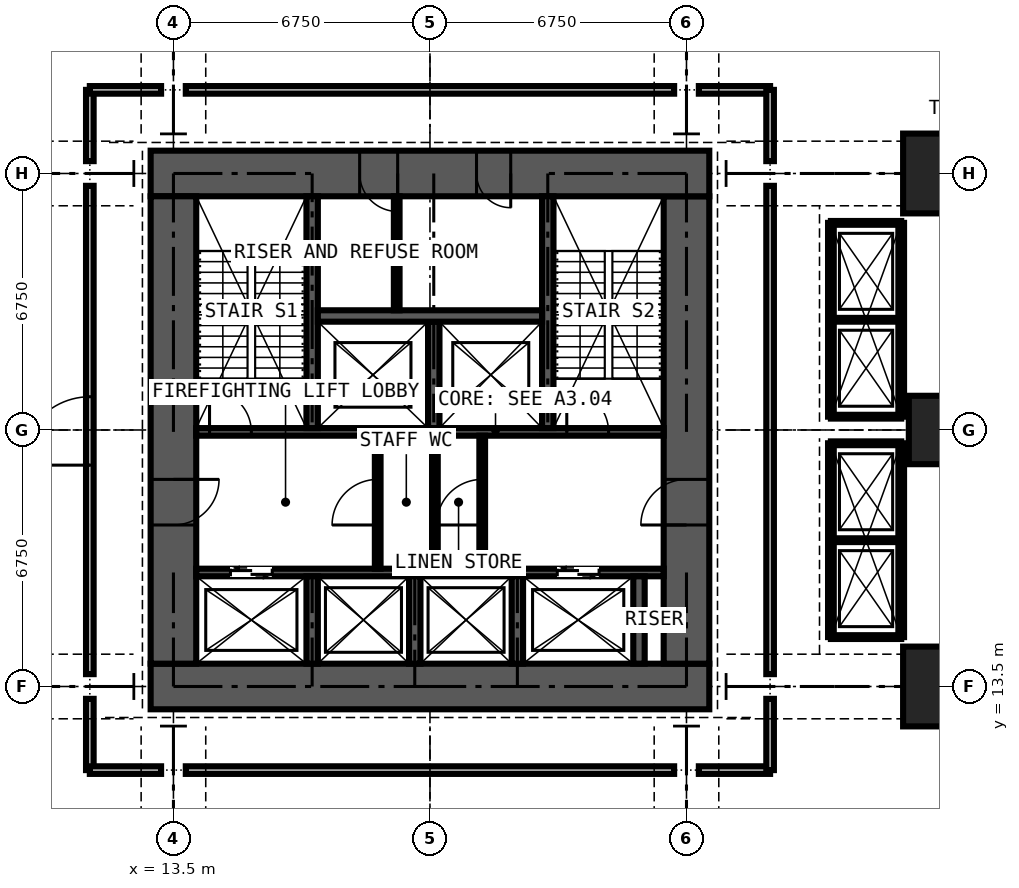
"""IFC4 building model, lengths in metres.
Left out: names, types, materials, properties, quantities, classifications, styles, units other than length and angle.
Written with IfcOpenShell. Run it as: python <this file> out.ifc"""

import sys

from ifc_helpers import new_model, si_unit, direction, frame, frame_2d, origin, origin_2d, place, context, subcontext, project, spatial, rectangle, extrude, element, fill, save


model = new_model("IFC4")
c1 = context("Model", 3, precision=1e-05, world=origin(), true_north=direction((0.0, 1.0)))
c2 = subcontext(c1, "Body", "Model", "MODEL_VIEW")
j1 = project(units=[si_unit("LENGTHUNIT", "METRE"), si_unit("PLANEANGLEUNIT", "RADIAN")], contexts=[c1])
p1 = place(None, origin())
s1 = spatial("IfcSite", under=j1, at=p1, CompositionType="ELEMENT")
p2 = place(p1, origin())
s2 = spatial("IfcBuilding", under=s1, at=p2, CompositionType="ELEMENT")
p3 = place(p2, frame((0.0, 0.0, 75.6)))
s3 = spatial("IfcBuildingStorey", under=s2, at=p3, CompositionType="ELEMENT", Elevation=75.6)
p4 = place(p3, frame((33.75, 13.5, 0.0), z_axis=(0.0, 0.0, 1.0), x_axis=(1.0, 0.0, 0.0)))
e1 = element("IfcColumn", 1, at=p4, inside=s3, PredefinedType="COLUMN", context=c2, shape_type="SweptSolid", body=[
    extrude(rectangle(XDim=2.1, YDim=2.1, at=origin_2d()), origin(), (0.0, 0.0, 1.0), 4.5),
])
p5 = place(p3, frame((33.75, 20.25, 0.0), z_axis=(0.0, 0.0, 1.0), x_axis=(1.0, 0.0, 0.0)))
e2 = element("IfcColumn", 2, at=p5, inside=s3, PredefinedType="COLUMN", context=c2, shape_type="SweptSolid", body=[
    extrude(rectangle(XDim=1.8, YDim=1.8, at=origin_2d()), origin(), (0.0, 0.0, 1.0), 4.5),
])
p6 = place(p3, frame((33.75, 27.0, 0.0), z_axis=(0.0, 0.0, 1.0), x_axis=(1.0, 0.0, 0.0)))
e3 = element("IfcColumn", 3, at=p6, inside=s3, PredefinedType="COLUMN", context=c2, shape_type="SweptSolid", body=[
    extrude(rectangle(XDim=2.1, YDim=2.1, at=origin_2d()), origin(), (0.0, 0.0, 1.0), 4.5),
])
p7 = place(p3, frame((12.9, 13.5, 0.0), z_axis=(0.0, 0.0, 1.0), x_axis=(1.0, 0.0, 0.0)))
e4 = element("IfcWall", 4, at=p7, inside=s3, PredefinedType="SHEAR", context=c2, shape_type="SweptSolid", body=[
    extrude(rectangle(XDim=14.7, YDim=1.2, at=frame_2d((7.35, 0.0))), origin(), (0.0, 0.0, 1.0), 4.5),
])
p8 = place(p3, frame((27.0, 14.1, 0.0), z_axis=(0.0, 0.0, 1.0), x_axis=(0.0, 1.0, 0.0)))
e5 = element("IfcWall", 5, at=p8, inside=s3, PredefinedType="SHEAR", context=c2, shape_type="SweptSolid", body=[
    extrude(rectangle(XDim=12.3, YDim=1.2, at=frame_2d((6.15, 0.0))), origin(), (0.0, 0.0, 1.0), 4.5),
])
p9 = place(p8, frame((3.65, 0.0, 0.0)))
e6 = element("IfcOpeningElement", 6, at=p9, cuts=e5, PredefinedType="OPENING", context=c2, shape_type="SweptSolid", body=[
    extrude(rectangle(XDim=1.2, YDim=2.2, at=frame_2d((0.6, 1.1))), frame((0.0, 0.61, 0.0), z_axis=(0.0, -1.0, 0.0), x_axis=(1.0, 0.0, 0.0)), (0.0, 0.0, 1.0), 1.22),
])
p10 = place(p3, frame((27.6, 27.0, 0.0), z_axis=(0.0, 0.0, 1.0), x_axis=(-1.0, 0.0, 0.0)))
e7 = element("IfcWall", 7, at=p10, inside=s3, PredefinedType="SHEAR", context=c2, shape_type="SweptSolid", body=[
    extrude(rectangle(XDim=14.7, YDim=1.2, at=frame_2d((7.35, 0.0))), origin(), (0.0, 0.0, 1.0), 4.5),
])
p11 = place(p10, frame((5.225, 0.0, 0.0)))
e8 = element("IfcOpeningElement", 8, at=p11, cuts=e7, PredefinedType="OPENING", context=c2, shape_type="SweptSolid", body=[
    extrude(rectangle(XDim=0.9, YDim=2.2, at=frame_2d((0.45, 1.1))), frame((0.0, 0.61, 0.0), z_axis=(0.0, -1.0, 0.0), x_axis=(1.0, 0.0, 0.0)), (0.0, 0.0, 1.0), 1.22),
])
p12 = place(p10, frame((8.2, 0.0, 0.0)))
e9 = element("IfcOpeningElement", 9, at=p12, cuts=e7, PredefinedType="OPENING", context=c2, shape_type="SweptSolid", body=[
    extrude(rectangle(XDim=1.0, YDim=2.2, at=frame_2d((0.5, 1.1))), frame((0.0, 0.61, 0.0), z_axis=(0.0, -1.0, 0.0), x_axis=(1.0, 0.0, 0.0)), (0.0, 0.0, 1.0), 1.22),
])
p13 = place(p3, frame((13.5, 26.4, 0.0), z_axis=(0.0, 0.0, 1.0), x_axis=(0.0, -1.0, 0.0)))
e10 = element("IfcWall", 10, at=p13, inside=s3, PredefinedType="SHEAR", context=c2, shape_type="SweptSolid", body=[
    extrude(rectangle(XDim=12.3, YDim=1.2, at=frame_2d((6.15, 0.0))), origin(), (0.0, 0.0, 1.0), 4.5),
])
p14 = place(p13, frame((7.45, 0.0, 0.0)))
e11 = element("IfcOpeningElement", 11, at=p14, cuts=e10, PredefinedType="OPENING", context=c2, shape_type="SweptSolid", body=[
    extrude(rectangle(XDim=1.2, YDim=2.2, at=frame_2d((0.6, 1.1))), frame((0.0, 0.61, 0.0), z_axis=(0.0, -1.0, 0.0), x_axis=(1.0, 0.0, 0.0)), (0.0, 0.0, 1.0), 1.22),
])
p15 = place(p3, frame((14.1, 16.5, 0.0), z_axis=(0.0, 0.0, 1.0), x_axis=(1.0, 0.0, 0.0)))
e12 = element("IfcWall", 12, at=p15, inside=s3, PredefinedType="SHEAR", context=c2, shape_type="SweptSolid", body=[
    extrude(rectangle(XDim=12.3, YDim=0.2, at=frame_2d((6.15, 0.0))), origin(), (0.0, 0.0, 1.0), 4.5),
])
p16 = place(p15, frame((0.9, 0.0, 0.0)))
e13 = element("IfcOpeningElement", 13, at=p16, cuts=e12, PredefinedType="OPENING", context=c2, shape_type="SweptSolid", body=[
    extrude(rectangle(XDim=1.1, YDim=2.2, at=frame_2d((0.55, 1.1))), frame((0.0, 0.11, 0.0), z_axis=(0.0, -1.0, 0.0), x_axis=(1.0, 0.0, 0.0)), (0.0, 0.0, 1.0), 0.22),
])
p17 = place(p15, frame((9.5, 0.0, 0.0)))
e14 = element("IfcOpeningElement", 14, at=p17, cuts=e12, PredefinedType="OPENING", context=c2, shape_type="SweptSolid", body=[
    extrude(rectangle(XDim=1.1, YDim=2.2, at=frame_2d((0.55, 1.1))), frame((0.0, 0.11, 0.0), z_axis=(0.0, -1.0, 0.0), x_axis=(1.0, 0.0, 0.0)), (0.0, 0.0, 1.0), 0.22),
])
p18 = place(p3, frame((14.1, 20.2, 0.0), z_axis=(0.0, 0.0, 1.0), x_axis=(1.0, 0.0, 0.0)))
e15 = element("IfcWall", 15, at=p18, inside=s3, PredefinedType="SHEAR", context=c2, shape_type="SweptSolid", body=[
    extrude(rectangle(XDim=12.3, YDim=0.2, at=frame_2d((6.15, 0.0))), origin(), (0.0, 0.0, 1.0), 4.5),
])
p19 = place(p18, frame((0.35, 0.0, 0.0)))
e16 = element("IfcOpeningElement", 16, at=p19, cuts=e15, PredefinedType="OPENING", context=c2, shape_type="SweptSolid", body=[
    extrude(rectangle(XDim=1.1, YDim=2.2, at=frame_2d((0.55, 1.1))), frame((0.0, 0.11, 0.0), z_axis=(0.0, -1.0, 0.0), x_axis=(1.0, 0.0, 0.0)), (0.0, 0.0, 1.0), 0.22),
])
p20 = place(p18, frame((9.75, 0.0, 0.0)))
e17 = element("IfcOpeningElement", 17, at=p20, cuts=e15, PredefinedType="OPENING", context=c2, shape_type="SweptSolid", body=[
    extrude(rectangle(XDim=1.1, YDim=2.2, at=frame_2d((0.55, 1.1))), frame((0.0, 0.11, 0.0), z_axis=(0.0, -1.0, 0.0), x_axis=(1.0, 0.0, 0.0)), (0.0, 0.0, 1.0), 0.22),
])
for number, where, z_axis, x_axis in (
    (18, (17.15, 20.3, 0.0), (0.0, 0.0, 1.0), (0.0, 1.0, 0.0)),
    (19, (23.35, 20.3, 0.0), (0.0, 0.0, 1.0), (0.0, 1.0, 0.0)),
):
    element("IfcWall", number, at=place(p3, frame(where, z_axis=z_axis, x_axis=x_axis)), inside=s3, PredefinedType="SHEAR", context=c2, shape_type="SweptSolid", body=[
        extrude(rectangle(XDim=6.1, YDim=0.3, at=frame_2d((3.05, 0.0))), origin(), (0.0, 0.0, 1.0), 4.5),
    ])
p21 = place(p3, frame((20.35, 20.3, 0.0), z_axis=(0.0, 0.0, 1.0), x_axis=(0.0, 1.0, 0.0)))
e20 = element("IfcWall", 20, at=p21, inside=s3, PredefinedType="SHEAR", context=c2, shape_type="SweptSolid", body=[
    extrude(rectangle(XDim=2.8, YDim=0.3, at=frame_2d((1.4, 0.0))), origin(), (0.0, 0.0, 1.0), 4.5),
])
p22 = place(p3, frame((17.3, 23.25, 0.0), z_axis=(0.0, 0.0, 1.0), x_axis=(1.0, 0.0, 0.0)))
e21 = element("IfcWall", 21, at=p22, inside=s3, PredefinedType="SHEAR", context=c2, shape_type="SweptSolid", body=[
    extrude(rectangle(XDim=5.9, YDim=0.3, at=frame_2d((2.95, 0.0))), origin(), (0.0, 0.0, 1.0), 4.5),
])
for number, where, z_axis, x_axis in (
    (22, (17.15, 14.1, 0.0), (0.0, 0.0, 1.0), (0.0, 1.0, 0.0)),
    (23, (19.85, 14.1, 0.0), (0.0, 0.0, 1.0), (0.0, 1.0, 0.0)),
    (24, (22.55, 14.1, 0.0), (0.0, 0.0, 1.0), (0.0, 1.0, 0.0)),
    (25, (25.75, 14.1, 0.0), (0.0, 0.0, 1.0), (0.0, 1.0, 0.0)),
):
    element("IfcWall", number, at=place(p3, frame(where, z_axis=z_axis, x_axis=x_axis)), inside=s3, PredefinedType="SHEAR", context=c2, shape_type="SweptSolid", body=[
        extrude(rectangle(XDim=2.3, YDim=0.3, at=frame_2d((1.15, 0.0))), origin(), (0.0, 0.0, 1.0), 4.5),
    ])
p23 = place(p3, frame((18.875, 16.6, 0.0), z_axis=(0.0, 0.0, 1.0), x_axis=(0.0, 1.0, 0.0)))
e26 = element("IfcWall", 26, at=p23, inside=s3, PredefinedType="PARTITIONING", context=c2, shape_type="SweptSolid", body=[
    extrude(rectangle(XDim=3.5, YDim=0.15, at=frame_2d((1.75, 0.0))), origin(), (0.0, 0.0, 1.0), 4.15),
])
p24 = place(p23, frame((1.15, 0.0, 0.0)))
e27 = element("IfcOpeningElement", 27, at=p24, cuts=e26, PredefinedType="OPENING", context=c2, shape_type="SweptSolid", body=[
    extrude(rectangle(XDim=1.2, YDim=2.2, at=frame_2d((0.6, 1.1))), frame((0.0, 0.085, 0.0), z_axis=(0.0, -1.0, 0.0), x_axis=(1.0, 0.0, 0.0)), (0.0, 0.0, 1.0), 0.17),
])
p25 = place(p3, frame((21.625, 16.6, 0.0), z_axis=(0.0, 0.0, 1.0), x_axis=(0.0, 1.0, 0.0)))
e28 = element("IfcWall", 28, at=p25, inside=s3, PredefinedType="PARTITIONING", context=c2, shape_type="SweptSolid", body=[
    extrude(rectangle(XDim=3.5, YDim=0.15, at=frame_2d((1.75, 0.0))), origin(), (0.0, 0.0, 1.0), 4.15),
])
p26 = place(p25, frame((1.15, 0.0, 0.0)))
e29 = element("IfcOpeningElement", 29, at=p26, cuts=e28, PredefinedType="OPENING", context=c2, shape_type="SweptSolid", body=[
    extrude(rectangle(XDim=1.2, YDim=2.2, at=frame_2d((0.6, 1.1))), frame((0.0, 0.085, 0.0), z_axis=(0.0, -1.0, 0.0), x_axis=(1.0, 0.0, 0.0)), (0.0, 0.0, 1.0), 0.17),
])
p27 = place(p3, frame((20.38, 16.6, 0.0), z_axis=(0.0, 0.0, 1.0), x_axis=(0.0, 1.0, 0.0)))
e30 = element("IfcWall", 30, at=p27, inside=s3, PredefinedType="PARTITIONING", context=c2, shape_type="SweptSolid", body=[
    extrude(rectangle(XDim=3.5, YDim=0.15, at=frame_2d((1.75, 0.0))), origin(), (0.0, 0.0, 1.0), 4.15),
])
p28 = place(p3, frame((19.375, 23.4, 0.0), z_axis=(0.0, 0.0, 1.0), x_axis=(0.0, 1.0, 0.0)))
e31 = element("IfcWall", 31, at=p28, inside=s3, PredefinedType="PARTITIONING", context=c2, shape_type="SweptSolid", body=[
    extrude(rectangle(XDim=3.0, YDim=0.15, at=frame_2d((1.5, 0.0))), origin(), (0.0, 0.0, 1.0), 4.15),
])
for number, where, z_axis, x_axis in (
    (32, (11.3, 11.3, 0.0), (0.0, 0.0, 1.0), (0.0, 1.0, 0.0)),
    (33, (11.3, 11.3, 0.0), (0.0, 0.0, 1.0), (1.0, 0.0, 0.0)),
):
    element("IfcWall", number, at=place(p3, frame(where, z_axis=z_axis, x_axis=x_axis)), inside=s3, PredefinedType="PARTITIONING", context=c2, shape_type="SweptSolid", body=[
        extrude(rectangle(XDim=1.875, YDim=0.2, at=frame_2d((0.938, 0.0))), origin(), (0.0, 0.0, 1.0), 4.15),
    ])
p29 = place(p3, frame((11.3, 13.825, 0.0), z_axis=(0.0, 0.0, 1.0), x_axis=(0.0, 1.0, 0.0)))
e34 = element("IfcWall", 34, at=p29, inside=s3, PredefinedType="PARTITIONING", context=c2, shape_type="SweptSolid", body=[
    extrude(rectangle(XDim=12.85, YDim=0.2, at=frame_2d((6.425, 0.0))), origin(), (0.0, 0.0, 1.0), 4.15),
])
p30 = place(p29, frame((5.5, 0.0, 0.0)))
e35 = element("IfcOpeningElement", 35, at=p30, cuts=e34, PredefinedType="OPENING", context=c2, shape_type="SweptSolid", body=[
    extrude(rectangle(XDim=1.8, YDim=2.4, at=frame_2d((0.9, 1.2))), frame((0.0, 0.11, 0.0), z_axis=(0.0, -1.0, 0.0), x_axis=(1.0, 0.0, 0.0)), (0.0, 0.0, 1.0), 0.22),
])
for number, where, z_axis, x_axis in (
    (36, (11.3, 27.325, 0.0), (0.0, 0.0, 1.0), (0.0, 1.0, 0.0)),
    (37, (11.3, 29.2, 0.0), (0.0, 0.0, 1.0), (1.0, 0.0, 0.0)),
):
    element("IfcWall", number, at=place(p3, frame(where, z_axis=z_axis, x_axis=x_axis)), inside=s3, PredefinedType="PARTITIONING", context=c2, shape_type="SweptSolid", body=[
        extrude(rectangle(XDim=1.875, YDim=0.2, at=frame_2d((0.938, 0.0))), origin(), (0.0, 0.0, 1.0), 4.15),
    ])
for number, where, z_axis, x_axis in (
    (38, (13.825, 11.3, 0.0), (0.0, 0.0, 1.0), (1.0, 0.0, 0.0)),
    (39, (13.825, 29.2, 0.0), (0.0, 0.0, 1.0), (1.0, 0.0, 0.0)),
):
    element("IfcWall", number, at=place(p3, frame(where, z_axis=z_axis, x_axis=x_axis)), inside=s3, PredefinedType="PARTITIONING", context=c2, shape_type="SweptSolid", body=[
        extrude(rectangle(XDim=12.85, YDim=0.2, at=frame_2d((6.425, 0.0))), origin(), (0.0, 0.0, 1.0), 4.15),
    ])
for number, where, z_axis, x_axis in (
    (40, (27.325, 11.3, 0.0), (0.0, 0.0, 1.0), (1.0, 0.0, 0.0)),
    (41, (27.325, 29.2, 0.0), (0.0, 0.0, 1.0), (1.0, 0.0, 0.0)),
    (42, (29.2, 11.3, 0.0), (0.0, 0.0, 1.0), (0.0, 1.0, 0.0)),
):
    element("IfcWall", number, at=place(p3, frame(where, z_axis=z_axis, x_axis=x_axis)), inside=s3, PredefinedType="PARTITIONING", context=c2, shape_type="SweptSolid", body=[
        extrude(rectangle(XDim=1.875, YDim=0.2, at=frame_2d((0.938, 0.0))), origin(), (0.0, 0.0, 1.0), 4.15),
    ])
p31 = place(p3, frame((29.2, 13.825, 0.0), z_axis=(0.0, 0.0, 1.0), x_axis=(0.0, 1.0, 0.0)))
e43 = element("IfcWall", 43, at=p31, inside=s3, PredefinedType="PARTITIONING", context=c2, shape_type="SweptSolid", body=[
    extrude(rectangle(XDim=12.85, YDim=0.2, at=frame_2d((6.425, 0.0))), origin(), (0.0, 0.0, 1.0), 4.15),
])
p32 = place(p3, frame((29.2, 27.325, 0.0), z_axis=(0.0, 0.0, 1.0), x_axis=(0.0, 1.0, 0.0)))
e44 = element("IfcWall", 44, at=p32, inside=s3, PredefinedType="PARTITIONING", context=c2, shape_type="SweptSolid", body=[
    extrude(rectangle(XDim=1.875, YDim=0.2, at=frame_2d((0.938, 0.0))), origin(), (0.0, 0.0, 1.0), 4.15),
])
p33 = place(p3, frame((30.8, 14.8, 0.0), z_axis=(0.0, 0.0, 1.0), x_axis=(0.0, 1.0, 0.0)))
e45 = element("IfcWall", 45, at=p33, inside=s3, PredefinedType="PARTITIONING", context=c2, shape_type="SweptSolid", body=[
    extrude(rectangle(XDim=5.1, YDim=0.15, at=frame_2d((2.55, 0.0))), origin(), (0.0, 0.0, 1.0), 4.15),
])
for number, where, z_axis, x_axis in (
    (46, (30.8, 14.8, 0.0), (0.0, 0.0, 1.0), (1.0, 0.0, 0.0)),
    (47, (30.8, 17.35, 0.0), (0.0, 0.0, 1.0), (1.0, 0.0, 0.0)),
    (48, (30.8, 19.9, 0.0), (0.0, 0.0, 1.0), (1.0, 0.0, 0.0)),
):
    element("IfcWall", number, at=place(p3, frame(where, z_axis=z_axis, x_axis=x_axis)), inside=s3, PredefinedType="SHEAR", context=c2, shape_type="SweptSolid", body=[
        extrude(rectangle(XDim=1.85, YDim=0.1, at=frame_2d((0.925, 0.0))), origin(), (0.0, 0.0, 1.0), 4.15),
    ])
p34 = place(p3, frame((30.8, 20.6, 0.0), z_axis=(0.0, 0.0, 1.0), x_axis=(0.0, 1.0, 0.0)))
e49 = element("IfcWall", 49, at=p34, inside=s3, PredefinedType="PARTITIONING", context=c2, shape_type="SweptSolid", body=[
    extrude(rectangle(XDim=5.1, YDim=0.15, at=frame_2d((2.55, 0.0))), origin(), (0.0, 0.0, 1.0), 4.15),
])
for number, where, z_axis, x_axis in (
    (50, (30.8, 20.6, 0.0), (0.0, 0.0, 1.0), (1.0, 0.0, 0.0)),
    (51, (30.8, 23.15, 0.0), (0.0, 0.0, 1.0), (1.0, 0.0, 0.0)),
    (52, (30.8, 25.7, 0.0), (0.0, 0.0, 1.0), (1.0, 0.0, 0.0)),
):
    element("IfcWall", number, at=place(p3, frame(where, z_axis=z_axis, x_axis=x_axis)), inside=s3, PredefinedType="SHEAR", context=c2, shape_type="SweptSolid", body=[
        extrude(rectangle(XDim=1.85, YDim=0.1, at=frame_2d((0.925, 0.0))), origin(), (0.0, 0.0, 1.0), 4.15),
    ])
for number, where, z_axis, x_axis in (
    (53, (32.65, 14.8, 0.0), (0.0, 0.0, 1.0), (0.0, 1.0, 0.0)),
    (54, (32.65, 20.6, 0.0), (0.0, 0.0, 1.0), (0.0, 1.0, 0.0)),
):
    element("IfcWall", number, at=place(p3, frame(where, z_axis=z_axis, x_axis=x_axis)), inside=s3, PredefinedType="PARTITIONING", context=c2, shape_type="SweptSolid", body=[
        extrude(rectangle(XDim=5.1, YDim=0.15, at=frame_2d((2.55, 0.0))), origin(), (0.0, 0.0, 1.0), 4.15),
    ])
p35 = place(p16, origin())
e55 = element("IfcDoor", 55, at=p35, inside=s3, OperationType="DOUBLE_DOOR_SLIDING", PredefinedType="DOOR", context=c2, shape_type="SweptSolid", body=[
    extrude(rectangle(XDim=1.1, YDim=2.2, at=frame_2d((0.55, 1.1))), frame((0.0, 0.025, 0.0), z_axis=(0.0, -1.0, 0.0), x_axis=(1.0, 0.0, 0.0)), (0.0, 0.0, 1.0), 0.05),
])
fill(e13, e55)
p36 = place(p17, origin())
e56 = element("IfcDoor", 56, at=p36, inside=s3, OperationType="DOUBLE_DOOR_SLIDING", PredefinedType="DOOR", context=c2, shape_type="SweptSolid", body=[
    extrude(rectangle(XDim=1.1, YDim=2.2, at=frame_2d((0.55, 1.1))), frame((0.0, 0.025, 0.0), z_axis=(0.0, -1.0, 0.0), x_axis=(1.0, 0.0, 0.0)), (0.0, 0.0, 1.0), 0.05),
])
fill(e14, e56)
p37 = place(p14, origin())
e57 = element("IfcDoor", 57, at=p37, inside=s3, OperationType="DOUBLE_DOOR_SINGLE_SWING", PredefinedType="DOOR", context=c2, shape_type="SweptSolid", body=[
    extrude(rectangle(XDim=1.2, YDim=2.2, at=frame_2d((0.6, 1.1))), frame((0.0, 0.025, 0.0), z_axis=(0.0, -1.0, 0.0), x_axis=(1.0, 0.0, 0.0)), (0.0, 0.0, 1.0), 0.05),
])
fill(e11, e57)
p38 = place(p9, origin())
e58 = element("IfcDoor", 58, at=p38, inside=s3, OperationType="DOUBLE_DOOR_SINGLE_SWING", PredefinedType="DOOR", context=c2, shape_type="SweptSolid", body=[
    extrude(rectangle(XDim=1.2, YDim=2.2, at=frame_2d((0.6, 1.1))), frame((0.0, 0.025, 0.0), z_axis=(0.0, -1.0, 0.0), x_axis=(1.0, 0.0, 0.0)), (0.0, 0.0, 1.0), 0.05),
])
fill(e6, e58)
p39 = place(p24, origin())
e59 = element("IfcDoor", 59, at=p39, inside=s3, OperationType="DOUBLE_DOOR_SINGLE_SWING", PredefinedType="DOOR", context=c2, shape_type="SweptSolid", body=[
    extrude(rectangle(XDim=1.2, YDim=2.2, at=frame_2d((0.6, 1.1))), frame((0.0, 0.025, 0.0), z_axis=(0.0, -1.0, 0.0), x_axis=(1.0, 0.0, 0.0)), (0.0, 0.0, 1.0), 0.05),
])
fill(e27, e59)
p40 = place(p26, origin())
e60 = element("IfcDoor", 60, at=p40, inside=s3, OperationType="DOUBLE_DOOR_SINGLE_SWING", PredefinedType="DOOR", context=c2, shape_type="SweptSolid", body=[
    extrude(rectangle(XDim=1.2, YDim=2.2, at=frame_2d((0.6, 1.1))), frame((0.0, 0.025, 0.0), z_axis=(0.0, -1.0, 0.0), x_axis=(1.0, 0.0, 0.0)), (0.0, 0.0, 1.0), 0.05),
])
fill(e29, e60)
p41 = place(p11, origin())
e61 = element("IfcDoor", 61, at=p41, inside=s3, OperationType="SINGLE_SWING_LEFT", PredefinedType="DOOR", context=c2, shape_type="SweptSolid", body=[
    extrude(rectangle(XDim=0.9, YDim=2.2, at=frame_2d((0.45, 1.1))), frame((0.0, 0.4, 0.0), z_axis=(0.0, -1.0, 0.0), x_axis=(1.0, 0.0, 0.0)), (0.0, 0.0, 1.0), 0.8),
])
fill(e8, e61)
p42 = place(p12, origin())
e62 = element("IfcDoor", 62, at=p42, inside=s3, OperationType="SINGLE_SWING_LEFT", PredefinedType="DOOR", context=c2, shape_type="SweptSolid", body=[
    extrude(rectangle(XDim=1.0, YDim=2.2, at=frame_2d((0.5, 1.1))), frame((0.0, 0.025, 0.0), z_axis=(0.0, -1.0, 0.0), x_axis=(1.0, 0.0, 0.0)), (0.0, 0.0, 1.0), 0.05),
])
fill(e9, e62)
p43 = place(p19, origin())
e63 = element("IfcDoor", 63, at=p43, inside=s3, OperationType="SINGLE_SWING_LEFT", PredefinedType="DOOR", context=c2, shape_type="SweptSolid", body=[
    extrude(rectangle(XDim=1.1, YDim=2.2, at=frame_2d((0.55, 1.1))), frame((0.0, 0.025, 0.0), z_axis=(0.0, -1.0, 0.0), x_axis=(1.0, 0.0, 0.0)), (0.0, 0.0, 1.0), 0.05),
])
fill(e16, e63)
p44 = place(p20, origin())
e64 = element("IfcDoor", 64, at=p44, inside=s3, OperationType="SINGLE_SWING_LEFT", PredefinedType="DOOR", context=c2, shape_type="SweptSolid", body=[
    extrude(rectangle(XDim=1.1, YDim=2.2, at=frame_2d((0.55, 1.1))), frame((0.0, 0.025, 0.0), z_axis=(0.0, -1.0, 0.0), x_axis=(1.0, 0.0, 0.0)), (0.0, 0.0, 1.0), 0.05),
])
fill(e17, e64)
p45 = place(p30, origin())
e65 = element("IfcDoor", 65, at=p45, inside=s3, OperationType="DOUBLE_DOOR_SINGLE_SWING", PredefinedType="DOOR", context=c2, shape_type="SweptSolid", body=[
    extrude(rectangle(XDim=1.8, YDim=2.4, at=frame_2d((0.9, 1.2))), frame((0.0, 0.025, 0.0), z_axis=(0.0, -1.0, 0.0), x_axis=(1.0, 0.0, 0.0)), (0.0, 0.0, 1.0), 0.05),
])
fill(e35, e65)
save(model, sys.argv[1])
